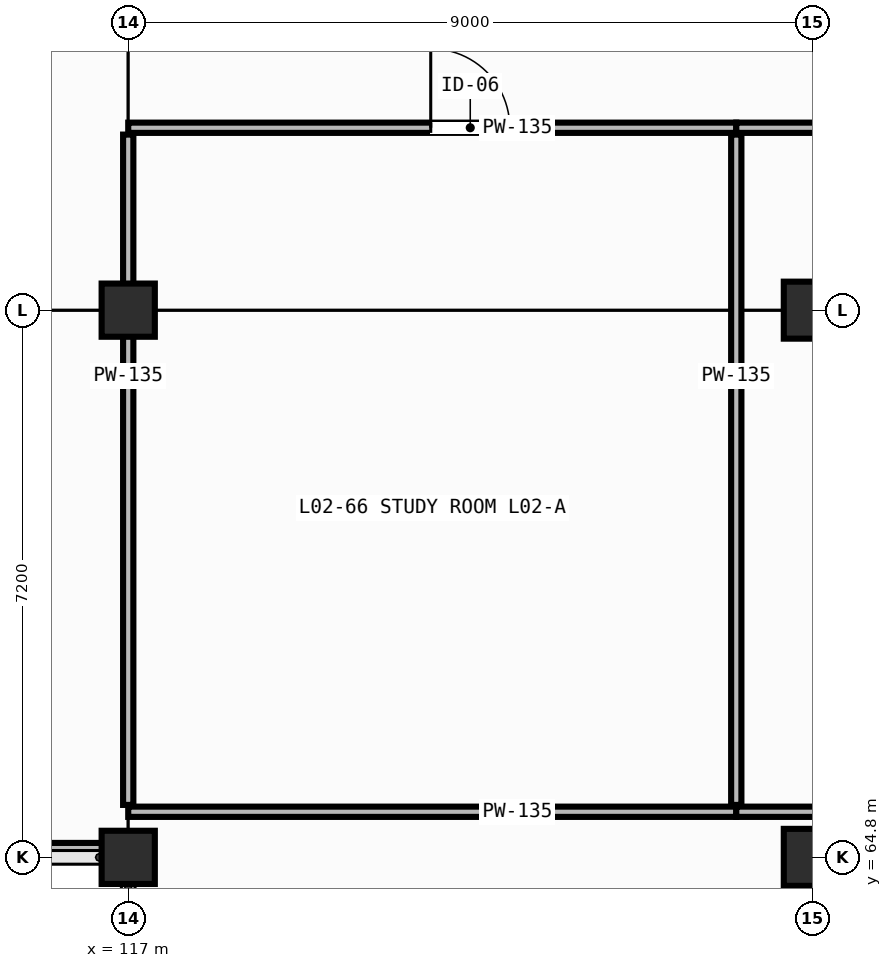
"""IFC4 building model, lengths in metres.
Left out: names, types, materials, properties, quantities, classifications, styles, units other than length and angle.
Written with IfcOpenShell. Run it as: python <this file> out.ifc"""

import sys

from ifc_helpers import new_model, si_unit, direction, frame, frame_2d, origin, origin_2d, place, context, subcontext, project, spatial, rectangle, hollow_rectangle, extrude, element, fill, save


model = new_model("IFC4")
c1 = context("Model", 3, precision=1e-05, world=origin(), true_north=direction((0.0, 1.0)))
c2 = subcontext(c1, "Body", "Model", "MODEL_VIEW")
j1 = project(units=[si_unit("LENGTHUNIT", "METRE"), si_unit("PLANEANGLEUNIT", "RADIAN")], contexts=[c1])
p1 = place(None, origin())
s1 = spatial("IfcSite", under=j1, at=p1, CompositionType="ELEMENT")
p2 = place(p1, origin())
s2 = spatial("IfcBuilding", under=s1, at=p2, CompositionType="ELEMENT")
p3 = place(p2, frame((0.0, 0.0, 4.8)))
s3 = spatial("IfcBuildingStorey", under=s2, at=p3, CompositionType="ELEMENT", Elevation=4.8)
for number, where, z_axis, x_axis in (
    (1, (117.0, 64.8, 0.0), (0.0, 0.0, 1.0), (1.0, 0.0, 0.0)),
    (2, (117.0, 72.0, 0.0), (0.0, 0.0, 1.0), (1.0, 0.0, 0.0)),
):
    element("IfcColumn", number, at=place(p3, frame(where, z_axis=z_axis, x_axis=x_axis)), inside=s3, PredefinedType="COLUMN", context=c2, shape_type="SweptSolid", body=[
        extrude(hollow_rectangle(XDim=0.7, YDim=0.7, WallThickness=0.028, at=origin_2d()), origin(), (0.0, 0.0, 1.0), 4.0),
    ])
for number, where, z_axis, x_axis in (
    (3, (126.0, 64.8, 0.0), (0.0, 0.0, 1.0), (1.0, 0.0, 0.0)),
    (4, (126.0, 72.0, 0.0), (0.0, 0.0, 1.0), (1.0, 0.0, 0.0)),
):
    element("IfcColumn", number, at=place(p3, frame(where, z_axis=z_axis, x_axis=x_axis)), inside=s3, PredefinedType="COLUMN", context=c2, shape_type="SweptSolid", body=[
        extrude(hollow_rectangle(XDim=0.75, YDim=0.75, WallThickness=0.032, at=origin_2d()), origin(), (0.0, 0.0, 1.0), 4.0),
    ])
p4 = place(p3, frame((108.0, 64.895, 4.0), z_axis=(0.0, 0.0, 1.0), x_axis=(1.0, 0.0, 0.0)))
e5 = element("IfcWall", 5, at=p4, inside=s3, PredefinedType="PARAPET", context=c2, shape_type="SweptSolid", body=[
    extrude(rectangle(XDim=9.0, YDim=0.19, at=frame_2d((4.5, 0.0))), origin(), (0.0, 0.0, 1.0), 0.65),
])
p5 = place(p3, frame((117.0, 65.4, 0.0), z_axis=(0.0, 0.0, 1.0), x_axis=(1.0, 0.0, 0.0)))
e6 = element("IfcWall", 6, at=p5, inside=s3, PredefinedType="PARTITIONING", context=c2, shape_type="SweptSolid", body=[
    extrude(rectangle(XDim=8.0, YDim=0.135, at=frame_2d((4.0, 0.0))), origin(), (0.0, 0.0, 1.0), 3.755),
])
p6 = place(p3, frame((117.0, 74.4, 0.0), z_axis=(0.0, 0.0, 1.0), x_axis=(1.0, 0.0, 0.0)))
e7 = element("IfcWall", 7, at=p6, inside=s3, PredefinedType="PARTITIONING", context=c2, shape_type="SweptSolid", body=[
    extrude(rectangle(XDim=8.0, YDim=0.135, at=frame_2d((4.0, 0.0))), origin(), (0.0, 0.0, 1.0), 3.755),
])
p7 = place(p6, frame((3.98, 0.0, 0.0)))
e8 = element("IfcOpeningElement", 8, at=p7, cuts=e7, PredefinedType="OPENING", context=c2, shape_type="SweptSolid", body=[
    extrude(rectangle(XDim=1.04, YDim=2.08, at=frame_2d((0.52, 1.04))), frame((0.0, 0.08, 0.0), z_axis=(0.0, -1.0, 0.0), x_axis=(1.0, 0.0, 0.0)), (0.0, 0.0, 1.0), 0.159),
])
p8 = place(p3, frame((117.0, 65.49, 0.0), z_axis=(0.0, 0.0, 1.0), x_axis=(0.0, 1.0, 0.0)))
e9 = element("IfcWall", 9, at=p8, inside=s3, PredefinedType="PARTITIONING", context=c2, shape_type="SweptSolid", body=[
    extrude(rectangle(XDim=8.82, YDim=0.135, at=frame_2d((4.41, 0.0))), origin(), (0.0, 0.0, 1.0), 3.035),
])
p9 = place(p3, frame((125.0, 65.49, 0.0), z_axis=(0.0, 0.0, 1.0), x_axis=(0.0, 1.0, 0.0)))
e10 = element("IfcWall", 10, at=p9, inside=s3, PredefinedType="PARTITIONING", context=c2, shape_type="SweptSolid", body=[
    extrude(rectangle(XDim=8.82, YDim=0.135, at=frame_2d((4.41, 0.0))), origin(), (0.0, 0.0, 1.0), 3.755),
])
p10 = place(p3, frame((125.0, 65.4, 0.0), z_axis=(0.0, 0.0, 1.0), x_axis=(1.0, 0.0, 0.0)))
e11 = element("IfcWall", 11, at=p10, inside=s3, PredefinedType="PARTITIONING", context=c2, shape_type="SweptSolid", body=[
    extrude(rectangle(XDim=8.0, YDim=0.135, at=frame_2d((4.0, 0.0))), origin(), (0.0, 0.0, 1.0), 3.755),
])
p11 = place(p3, frame((125.0, 74.4, 0.0), z_axis=(0.0, 0.0, 1.0), x_axis=(1.0, 0.0, 0.0)))
e12 = element("IfcWall", 12, at=p11, inside=s3, PredefinedType="PARTITIONING", context=c2, shape_type="SweptSolid", body=[
    extrude(rectangle(XDim=8.0, YDim=0.135, at=frame_2d((4.0, 0.0))), origin(), (0.0, 0.0, 1.0), 3.755),
])
p12 = place(p11, frame((3.52, 0.0, 0.0)))
e13 = element("IfcOpeningElement", 13, at=p12, cuts=e12, PredefinedType="OPENING", context=c2, shape_type="SweptSolid", body=[
    extrude(rectangle(XDim=0.96, YDim=2.1, at=frame_2d((0.48, 1.05))), frame((0.0, 0.08, 0.0), z_axis=(0.0, -1.0, 0.0), x_axis=(1.0, 0.0, 0.0)), (0.0, 0.0, 1.0), 0.159),
])
p13 = place(p7, origin())
e14 = element("IfcDoor", 14, at=p13, inside=s3, OperationType="SINGLE_SWING_LEFT", PredefinedType="DOOR", context=c2, shape_type="SweptSolid", body=[
    extrude(rectangle(XDim=1.04, YDim=2.08, at=frame_2d((0.52, 1.04))), frame((0.0, 0.025, 0.0), z_axis=(0.0, -1.0, 0.0), x_axis=(1.0, 0.0, 0.0)), (0.0, 0.0, 1.0), 0.05),
])
fill(e8, e14)
save(model, sys.argv[1])
